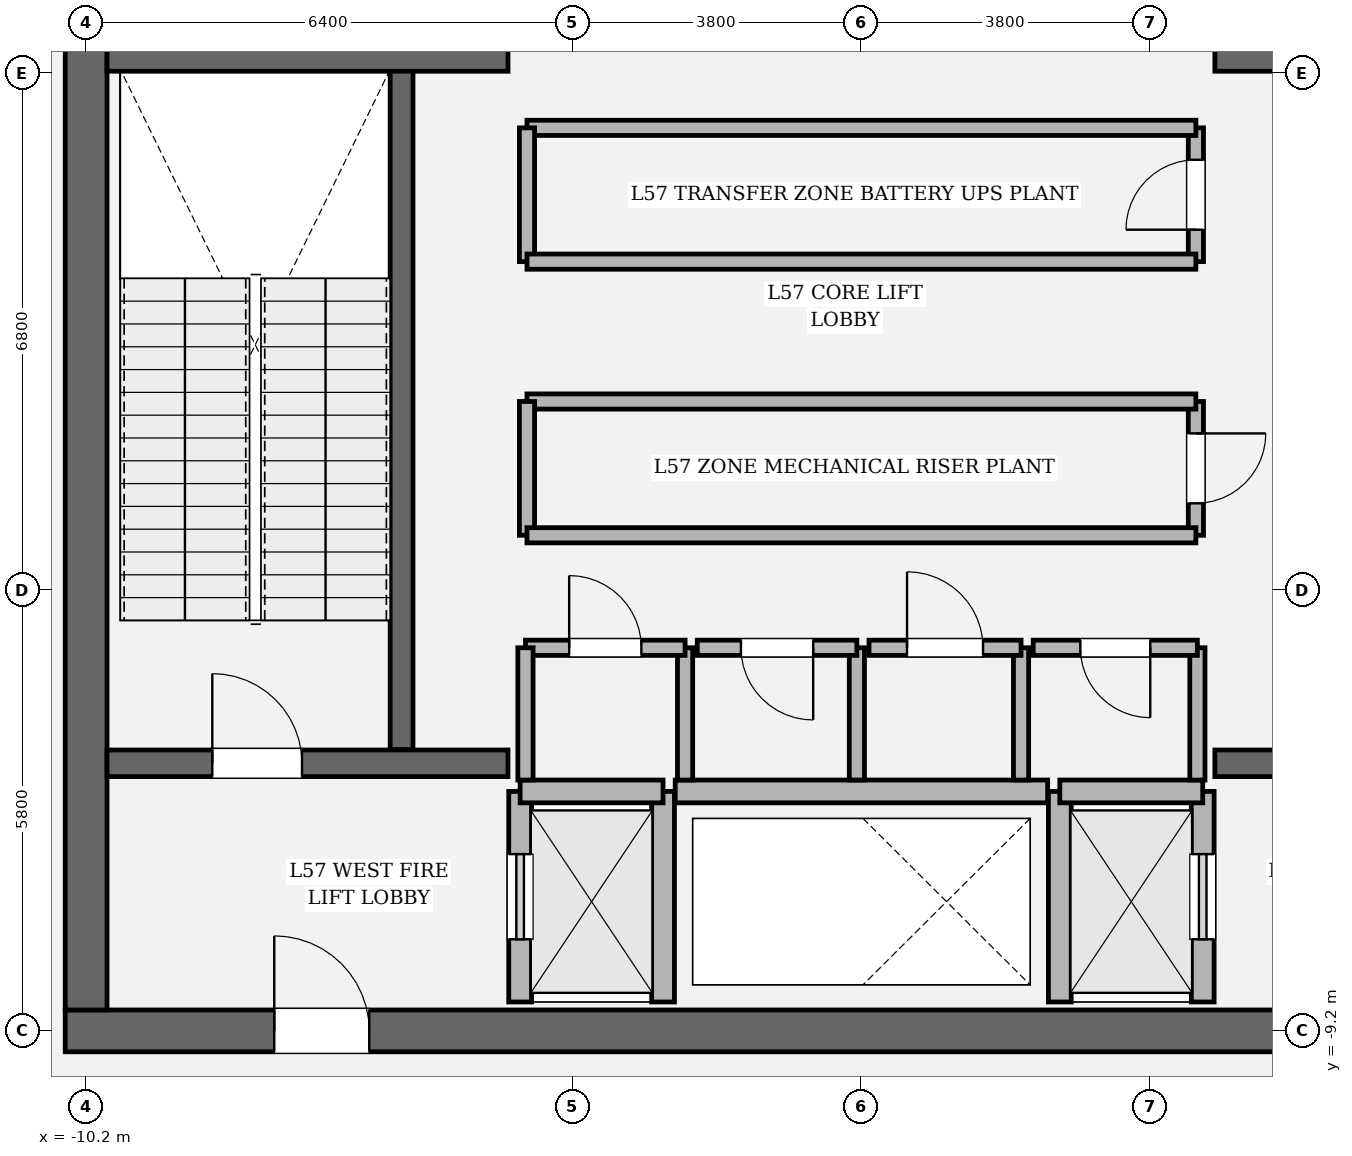
"""IFC4 building model, lengths in metres.
Left out: names, types, materials, properties, quantities, classifications, styles, units other than length and angle.
Written with IfcOpenShell. Run it as: python <this file> out.ifc"""

import sys

from ifc_helpers import new_model, si_unit, direction, frame, frame_2d, origin, place, context, subcontext, project, spatial, rectangle, extrude, element, fill, save


model = new_model("IFC4")
c1 = context("Model", 3, precision=1e-05, world=origin(), true_north=direction((0.0, 1.0)))
c2 = subcontext(c1, "Body", "Model", "MODEL_VIEW")
j1 = project(units=[si_unit("LENGTHUNIT", "METRE"), si_unit("PLANEANGLEUNIT", "RADIAN")], contexts=[c1])
p1 = place(None, origin())
s1 = spatial("IfcSite", under=j1, at=p1, CompositionType="ELEMENT")
p2 = place(p1, origin())
s2 = spatial("IfcBuilding", under=s1, at=p2, CompositionType="ELEMENT")
p3 = place(p2, frame((0.0, 0.0, 241.8)))
s3 = spatial("IfcBuildingStorey", under=s2, at=p3, CompositionType="ELEMENT", Elevation=241.8)
p4 = place(p3, frame((10.475, -9.2, 0.0), z_axis=(0.0, 0.0, 1.0), x_axis=(-1.0, 0.0, 0.0)))
e1 = element("IfcWall", 1, at=p4, inside=s3, PredefinedType="SHEAR", context=c2, shape_type="SweptSolid", body=[
    extrude(rectangle(XDim=20.95, YDim=0.55, at=frame_2d((10.475, 0.0))), origin(), (0.0, 0.0, 1.0), 4.8),
])
p5 = place(p4, frame((2.75, 0.0, 0.0)))
e2 = element("IfcOpeningElement", 2, at=p5, cuts=e1, PredefinedType="OPENING", context=c2, shape_type="SweptSolid", body=[
    extrude(rectangle(XDim=1.25, YDim=2.25, at=frame_2d((0.625, 1.125))), frame((0.0, 0.285, 0.0), z_axis=(0.0, -1.0, 0.0), x_axis=(1.0, 0.0, 0.0)), (0.0, 0.0, 1.0), 0.57),
])
p6 = place(p4, frame((16.95, 0.0, 0.0)))
e3 = element("IfcOpeningElement", 3, at=p6, cuts=e1, PredefinedType="OPENING", context=c2, shape_type="SweptSolid", body=[
    extrude(rectangle(XDim=1.25, YDim=2.25, at=frame_2d((0.625, 1.125))), frame((0.0, 0.285, 0.0), z_axis=(0.0, -1.0, 0.0), x_axis=(1.0, 0.0, 0.0)), (0.0, 0.0, 1.0), 0.57),
])
p7 = place(p3, frame((-10.2, -8.925, 0.0), z_axis=(0.0, 0.0, 1.0), x_axis=(0.0, 1.0, 0.0)))
e4 = element("IfcWall", 4, at=p7, inside=s3, PredefinedType="SHEAR", context=c2, shape_type="SweptSolid", body=[
    extrude(rectangle(XDim=17.85, YDim=0.55, at=frame_2d((8.925, 0.0))), origin(), (0.0, 0.0, 1.0), 4.8),
])
p8 = place(p7, frame((12.715, 0.0, 0.0)))
e5 = element("IfcOpeningElement", 5, at=p8, cuts=e4, PredefinedType="OPENING", context=c2, shape_type="SweptSolid", body=[
    extrude(rectangle(XDim=1.18, YDim=2.2, at=frame_2d((0.59, 1.1))), frame((0.0, 0.285, 0.0), z_axis=(0.0, -1.0, 0.0), x_axis=(1.0, 0.0, 0.0)), (0.0, 0.0, 1.0), 0.57),
])
p9 = place(p3, frame((-6.05, -5.5, 0.0), z_axis=(0.0, 0.0, 1.0), x_axis=(0.0, 1.0, 0.0)))
e6 = element("IfcWall", 6, at=p9, inside=s3, PredefinedType="SOLIDWALL", context=c2, shape_type="SweptSolid", body=[
    extrude(rectangle(XDim=8.95, YDim=0.3, at=frame_2d((4.475, 0.0))), origin(), (0.0, 0.0, 1.0), 4.8),
])
p10 = place(p3, frame((-9.925, -5.68, 0.0), z_axis=(0.0, 0.0, 1.0), x_axis=(1.0, 0.0, 0.0)))
e7 = element("IfcWall", 7, at=p10, inside=s3, PredefinedType="SOLIDWALL", context=c2, shape_type="SweptSolid", body=[
    extrude(rectangle(XDim=5.275, YDim=0.35, at=frame_2d((2.638, 0.0))), origin(), (0.0, 0.0, 1.0), 4.8),
])
p11 = place(p10, frame((1.385, 0.0, 0.0)))
e8 = element("IfcOpeningElement", 8, at=p11, cuts=e7, PredefinedType="OPENING", context=c2, shape_type="SweptSolid", body=[
    extrude(rectangle(XDim=1.18, YDim=2.2, at=frame_2d((0.59, 1.1))), frame((0.0, 0.185, 0.0), z_axis=(0.0, -1.0, 0.0), x_axis=(1.0, 0.0, 0.0)), (0.0, 0.0, 1.0), 0.37),
])
p12 = place(p3, frame((4.65, -5.68, 0.0), z_axis=(0.0, 0.0, 1.0), x_axis=(1.0, 0.0, 0.0)))
e9 = element("IfcWall", 9, at=p12, inside=s3, PredefinedType="SOLIDWALL", context=c2, shape_type="SweptSolid", body=[
    extrude(rectangle(XDim=5.275, YDim=0.35, at=frame_2d((2.638, 0.0))), origin(), (0.0, 0.0, 1.0), 4.8),
])
p13 = place(p12, frame((2.71, 0.0, 0.0)))
e10 = element("IfcOpeningElement", 10, at=p13, cuts=e9, PredefinedType="OPENING", context=c2, shape_type="SweptSolid", body=[
    extrude(rectangle(XDim=1.18, YDim=2.2, at=frame_2d((0.59, 1.1))), frame((0.0, 0.185, 0.0), z_axis=(0.0, -1.0, 0.0), x_axis=(1.0, 0.0, 0.0)), (0.0, 0.0, 1.0), 0.37),
])
for number, where, z_axis, x_axis in (
    (11, (-9.925, 3.6, 0.0), (0.0, 0.0, 1.0), (1.0, 0.0, 0.0)),
    (12, (4.65, 3.6, 0.0), (0.0, 0.0, 1.0), (1.0, 0.0, 0.0)),
):
    element("IfcWall", number, at=place(p3, frame(where, z_axis=z_axis, x_axis=x_axis)), inside=s3, PredefinedType="SOLIDWALL", context=c2, shape_type="SweptSolid", body=[
        extrude(rectangle(XDim=5.275, YDim=0.35, at=frame_2d((2.638, 0.0))), origin(), (0.0, 0.0, 1.0), 4.8),
    ])
p14 = place(p3, frame((-4.49, -8.82, 0.0), z_axis=(0.0, 0.0, 1.0), x_axis=(0.0, 1.0, 0.0)))
e13 = element("IfcWall", 13, at=p14, inside=s3, PredefinedType="SOLIDWALL", context=c2, shape_type="SweptSolid", body=[
    extrude(rectangle(XDim=2.77, YDim=0.3, at=frame_2d((1.385, 0.0))), origin(), (0.0, 0.0, 1.0), 4.54),
])
p15 = place(p14, frame((0.825, 0.0, 0.0)))
e14 = element("IfcOpeningElement", 14, at=p15, cuts=e13, PredefinedType="OPENING", context=c2, shape_type="SweptSolid", body=[
    extrude(rectangle(XDim=1.12, YDim=2.25, at=frame_2d((0.56, 1.125))), frame((0.0, 0.16, 0.0), z_axis=(0.0, -1.0, 0.0), x_axis=(1.0, 0.0, 0.0)), (0.0, 0.0, 1.0), 0.32),
])
p16 = place(p3, frame((-2.61, -8.82, 0.0), z_axis=(0.0, 0.0, 1.0), x_axis=(0.0, 1.0, 0.0)))
e15 = element("IfcWall", 15, at=p16, inside=s3, PredefinedType="SOLIDWALL", context=c2, shape_type="SweptSolid", body=[
    extrude(rectangle(XDim=2.77, YDim=0.3, at=frame_2d((1.385, 0.0))), origin(), (0.0, 0.0, 1.0), 4.54),
])
p17 = place(p3, frame((-4.49, -6.05, 0.0), z_axis=(0.0, 0.0, 1.0), x_axis=(1.0, 0.0, 0.0)))
e16 = element("IfcWall", 16, at=p17, inside=s3, PredefinedType="SOLIDWALL", context=c2, shape_type="SweptSolid", body=[
    extrude(rectangle(XDim=1.88, YDim=0.3, at=frame_2d((0.94, 0.0))), origin(), (0.0, 0.0, 1.0), 4.54),
])
p18 = place(p3, frame((4.49, -8.82, 0.0), z_axis=(0.0, 0.0, 1.0), x_axis=(0.0, 1.0, 0.0)))
e17 = element("IfcWall", 17, at=p18, inside=s3, PredefinedType="SOLIDWALL", context=c2, shape_type="SweptSolid", body=[
    extrude(rectangle(XDim=2.77, YDim=0.3, at=frame_2d((1.385, 0.0))), origin(), (0.0, 0.0, 1.0), 4.54),
])
p19 = place(p18, frame((0.825, 0.0, 0.0)))
e18 = element("IfcOpeningElement", 18, at=p19, cuts=e17, PredefinedType="OPENING", context=c2, shape_type="SweptSolid", body=[
    extrude(rectangle(XDim=1.12, YDim=2.25, at=frame_2d((0.56, 1.125))), frame((0.0, 0.16, 0.0), z_axis=(0.0, -1.0, 0.0), x_axis=(1.0, 0.0, 0.0)), (0.0, 0.0, 1.0), 0.32),
])
p20 = place(p3, frame((2.61, -8.82, 0.0), z_axis=(0.0, 0.0, 1.0), x_axis=(0.0, 1.0, 0.0)))
e19 = element("IfcWall", 19, at=p20, inside=s3, PredefinedType="SOLIDWALL", context=c2, shape_type="SweptSolid", body=[
    extrude(rectangle(XDim=2.77, YDim=0.3, at=frame_2d((1.385, 0.0))), origin(), (0.0, 0.0, 1.0), 4.54),
])
p21 = place(p3, frame((2.61, -6.05, 0.0), z_axis=(0.0, 0.0, 1.0), x_axis=(1.0, 0.0, 0.0)))
e20 = element("IfcWall", 20, at=p21, inside=s3, PredefinedType="SOLIDWALL", context=c2, shape_type="SweptSolid", body=[
    extrude(rectangle(XDim=1.88, YDim=0.3, at=frame_2d((0.94, 0.0))), origin(), (0.0, 0.0, 1.0), 4.54),
])
p22 = place(p3, frame((-2.45, -6.05, 0.0), z_axis=(0.0, 0.0, 1.0), x_axis=(1.0, 0.0, 0.0)))
e21 = element("IfcWall", 21, at=p22, inside=s3, PredefinedType="SOLIDWALL", context=c2, shape_type="SweptSolid", body=[
    extrude(rectangle(XDim=4.9, YDim=0.3, at=frame_2d((2.45, 0.0))), origin(), (0.0, 0.0, 1.0), 4.54),
])
p23 = place(p3, frame((-2.32, -5.9, 0.0), z_axis=(0.0, 0.0, 1.0), x_axis=(0.0, 1.0, 0.0)))
e22 = element("IfcWall", 22, at=p23, inside=s3, PredefinedType="SOLIDWALL", context=c2, shape_type="SweptSolid", body=[
    extrude(rectangle(XDim=1.74, YDim=0.2, at=frame_2d((0.87, 0.0))), origin(), (0.0, 0.0, 1.0), 4.54),
])
p24 = place(p3, frame((-2.32, -4.16, 0.0), z_axis=(0.0, 0.0, 1.0), x_axis=(-1.0, 0.0, 0.0)))
e23 = element("IfcWall", 23, at=p24, inside=s3, PredefinedType="SOLIDWALL", context=c2, shape_type="SweptSolid", body=[
    extrude(rectangle(XDim=2.1, YDim=0.2, at=frame_2d((1.05, 0.0))), origin(), (0.0, 0.0, 1.0), 4.54),
])
p25 = place(p24, frame((0.575, 0.0, 0.0)))
e24 = element("IfcOpeningElement", 24, at=p25, cuts=e23, PredefinedType="OPENING", context=c2, shape_type="SweptSolid", body=[
    extrude(rectangle(XDim=0.95, YDim=2.15, at=frame_2d((0.475, 1.075))), frame((0.0, 0.11, 0.0), z_axis=(0.0, -1.0, 0.0), x_axis=(1.0, 0.0, 0.0)), (0.0, 0.0, 1.0), 0.22),
])
for number, where, z_axis, x_axis in (
    (25, (-4.42, -4.16, 0.0), (0.0, 0.0, 1.0), (0.0, -1.0, 0.0)),
    (26, (-0.06, -5.9, 0.0), (0.0, 0.0, 1.0), (0.0, 1.0, 0.0)),
):
    element("IfcWall", number, at=place(p3, frame(where, z_axis=z_axis, x_axis=x_axis)), inside=s3, PredefinedType="SOLIDWALL", context=c2, shape_type="SweptSolid", body=[
        extrude(rectangle(XDim=1.74, YDim=0.2, at=frame_2d((0.87, 0.0))), origin(), (0.0, 0.0, 1.0), 4.54),
    ])
p26 = place(p3, frame((-0.06, -4.16, 0.0), z_axis=(0.0, 0.0, 1.0), x_axis=(-1.0, 0.0, 0.0)))
e27 = element("IfcWall", 27, at=p26, inside=s3, PredefinedType="SOLIDWALL", context=c2, shape_type="SweptSolid", body=[
    extrude(rectangle(XDim=2.1, YDim=0.2, at=frame_2d((1.05, 0.0))), origin(), (0.0, 0.0, 1.0), 4.54),
])
p27 = place(p26, frame((0.575, 0.0, 0.0)))
e28 = element("IfcOpeningElement", 28, at=p27, cuts=e27, PredefinedType="OPENING", context=c2, shape_type="SweptSolid", body=[
    extrude(rectangle(XDim=0.95, YDim=2.15, at=frame_2d((0.475, 1.075))), frame((0.0, 0.11, 0.0), z_axis=(0.0, -1.0, 0.0), x_axis=(1.0, 0.0, 0.0)), (0.0, 0.0, 1.0), 0.22),
])
p28 = place(p3, frame((2.1, -5.9, 0.0), z_axis=(0.0, 0.0, 1.0), x_axis=(0.0, 1.0, 0.0)))
e29 = element("IfcWall", 29, at=p28, inside=s3, PredefinedType="SOLIDWALL", context=c2, shape_type="SweptSolid", body=[
    extrude(rectangle(XDim=1.74, YDim=0.2, at=frame_2d((0.87, 0.0))), origin(), (0.0, 0.0, 1.0), 4.54),
])
p29 = place(p3, frame((2.1, -4.16, 0.0), z_axis=(0.0, 0.0, 1.0), x_axis=(-1.0, 0.0, 0.0)))
e30 = element("IfcWall", 30, at=p29, inside=s3, PredefinedType="SOLIDWALL", context=c2, shape_type="SweptSolid", body=[
    extrude(rectangle(XDim=2.0, YDim=0.2, at=frame_2d((1.0, 0.0))), origin(), (0.0, 0.0, 1.0), 4.54),
])
p30 = place(p29, frame((0.5, 0.0, 0.0)))
e31 = element("IfcOpeningElement", 31, at=p30, cuts=e30, PredefinedType="OPENING", context=c2, shape_type="SweptSolid", body=[
    extrude(rectangle(XDim=1.0, YDim=2.15, at=frame_2d((0.5, 1.075))), frame((0.0, 0.11, 0.0), z_axis=(0.0, -1.0, 0.0), x_axis=(1.0, 0.0, 0.0)), (0.0, 0.0, 1.0), 0.22),
])
p31 = place(p3, frame((4.42, -5.9, 0.0), z_axis=(0.0, 0.0, 1.0), x_axis=(0.0, 1.0, 0.0)))
e32 = element("IfcWall", 32, at=p31, inside=s3, PredefinedType="SOLIDWALL", context=c2, shape_type="SweptSolid", body=[
    extrude(rectangle(XDim=1.74, YDim=0.2, at=frame_2d((0.87, 0.0))), origin(), (0.0, 0.0, 1.0), 4.54),
])
p32 = place(p3, frame((4.42, -4.16, 0.0), z_axis=(0.0, 0.0, 1.0), x_axis=(-1.0, 0.0, 0.0)))
e33 = element("IfcWall", 33, at=p32, inside=s3, PredefinedType="SOLIDWALL", context=c2, shape_type="SweptSolid", body=[
    extrude(rectangle(XDim=2.16, YDim=0.2, at=frame_2d((1.08, 0.0))), origin(), (0.0, 0.0, 1.0), 4.54),
])
p33 = place(p32, frame((0.62, 0.0, 0.0)))
e34 = element("IfcOpeningElement", 34, at=p33, cuts=e33, PredefinedType="OPENING", context=c2, shape_type="SweptSolid", body=[
    extrude(rectangle(XDim=0.92, YDim=2.1, at=frame_2d((0.46, 1.05))), frame((0.0, 0.11, 0.0), z_axis=(0.0, -1.0, 0.0), x_axis=(1.0, 0.0, 0.0)), (0.0, 0.0, 1.0), 0.22),
])
p34 = place(p3, frame((4.4, -2.68, 0.0), z_axis=(0.0, 0.0, 1.0), x_axis=(0.0, 1.0, 0.0)))
e35 = element("IfcWall", 35, at=p34, inside=s3, PredefinedType="SOLIDWALL", context=c2, shape_type="SweptSolid", body=[
    extrude(rectangle(XDim=1.76, YDim=0.2, at=frame_2d((0.88, 0.0))), origin(), (0.0, 0.0, 1.0), 4.54),
])
p35 = place(p34, frame((0.42, 0.0, 0.0)))
e36 = element("IfcOpeningElement", 36, at=p35, cuts=e35, PredefinedType="OPENING", context=c2, shape_type="SweptSolid", body=[
    extrude(rectangle(XDim=0.92, YDim=2.1, at=frame_2d((0.46, 1.05))), frame((0.0, 0.11, 0.0), z_axis=(0.0, -1.0, 0.0), x_axis=(1.0, 0.0, 0.0)), (0.0, 0.0, 1.0), 0.22),
])
p36 = place(p3, frame((4.4, -0.92, 0.0), z_axis=(0.0, 0.0, 1.0), x_axis=(-1.0, 0.0, 0.0)))
e37 = element("IfcWall", 37, at=p36, inside=s3, PredefinedType="SOLIDWALL", context=c2, shape_type="SweptSolid", body=[
    extrude(rectangle(XDim=8.8, YDim=0.2, at=frame_2d((4.4, 0.0))), origin(), (0.0, 0.0, 1.0), 4.54),
])
p37 = place(p3, frame((-4.4, -0.92, 0.0), z_axis=(0.0, 0.0, 1.0), x_axis=(0.0, -1.0, 0.0)))
e38 = element("IfcWall", 38, at=p37, inside=s3, PredefinedType="SOLIDWALL", context=c2, shape_type="SweptSolid", body=[
    extrude(rectangle(XDim=1.76, YDim=0.2, at=frame_2d((0.88, 0.0))), origin(), (0.0, 0.0, 1.0), 4.54),
])
p38 = place(p3, frame((-4.4, -2.68, 0.0), z_axis=(0.0, 0.0, 1.0), x_axis=(1.0, 0.0, 0.0)))
e39 = element("IfcWall", 39, at=p38, inside=s3, PredefinedType="SOLIDWALL", context=c2, shape_type="SweptSolid", body=[
    extrude(rectangle(XDim=8.8, YDim=0.2, at=frame_2d((4.4, 0.0))), origin(), (0.0, 0.0, 1.0), 4.54),
])
p39 = place(p3, frame((4.4, 0.92, 0.0), z_axis=(0.0, 0.0, 1.0), x_axis=(0.0, 1.0, 0.0)))
e40 = element("IfcWall", 40, at=p39, inside=s3, PredefinedType="SOLIDWALL", context=c2, shape_type="SweptSolid", body=[
    extrude(rectangle(XDim=1.76, YDim=0.2, at=frame_2d((0.88, 0.0))), origin(), (0.0, 0.0, 1.0), 4.54),
])
p40 = place(p39, frame((0.42, 0.0, 0.0)))
e41 = element("IfcOpeningElement", 41, at=p40, cuts=e40, PredefinedType="OPENING", context=c2, shape_type="SweptSolid", body=[
    extrude(rectangle(XDim=0.92, YDim=2.1, at=frame_2d((0.46, 1.05))), frame((0.0, 0.11, 0.0), z_axis=(0.0, -1.0, 0.0), x_axis=(1.0, 0.0, 0.0)), (0.0, 0.0, 1.0), 0.22),
])
p41 = place(p3, frame((4.4, 2.68, 0.0), z_axis=(0.0, 0.0, 1.0), x_axis=(-1.0, 0.0, 0.0)))
e42 = element("IfcWall", 42, at=p41, inside=s3, PredefinedType="SOLIDWALL", context=c2, shape_type="SweptSolid", body=[
    extrude(rectangle(XDim=8.8, YDim=0.2, at=frame_2d((4.4, 0.0))), origin(), (0.0, 0.0, 1.0), 4.54),
])
p42 = place(p3, frame((-4.4, 2.68, 0.0), z_axis=(0.0, 0.0, 1.0), x_axis=(0.0, -1.0, 0.0)))
e43 = element("IfcWall", 43, at=p42, inside=s3, PredefinedType="SOLIDWALL", context=c2, shape_type="SweptSolid", body=[
    extrude(rectangle(XDim=1.76, YDim=0.2, at=frame_2d((0.88, 0.0))), origin(), (0.0, 0.0, 1.0), 4.54),
])
p43 = place(p3, frame((-4.4, 0.92, 0.0), z_axis=(0.0, 0.0, 1.0), x_axis=(1.0, 0.0, 0.0)))
e44 = element("IfcWall", 44, at=p43, inside=s3, PredefinedType="SOLIDWALL", context=c2, shape_type="SweptSolid", body=[
    extrude(rectangle(XDim=8.8, YDim=0.2, at=frame_2d((4.4, 0.0))), origin(), (0.0, 0.0, 1.0), 4.54),
])
p44 = place(p11, origin())
e45 = element("IfcDoor", 45, at=p44, inside=s3, OperationType="SINGLE_SWING_LEFT", PredefinedType="DOOR", context=c2, shape_type="SweptSolid", body=[
    extrude(rectangle(XDim=1.18, YDim=2.2, at=frame_2d((0.59, 1.1))), frame((0.0, 0.025, 0.0), z_axis=(0.0, -1.0, 0.0), x_axis=(1.0, 0.0, 0.0)), (0.0, 0.0, 1.0), 0.05),
])
fill(e8, e45)
p45 = place(p6, origin())
e46 = element("IfcDoor", 46, at=p45, inside=s3, OperationType="SINGLE_SWING_RIGHT", PredefinedType="DOOR", context=c2, shape_type="SweptSolid", body=[
    extrude(rectangle(XDim=1.25, YDim=2.25, at=frame_2d((0.625, 1.125))), frame((0.0, 0.025, 0.0), z_axis=(0.0, -1.0, 0.0), x_axis=(1.0, 0.0, 0.0)), (0.0, 0.0, 1.0), 0.05),
])
fill(e3, e46)
p46 = place(p15, origin())
e47 = element("IfcDoor", 47, at=p46, inside=s3, OperationType="SLIDING_TO_LEFT", PredefinedType="DOOR", context=c2, shape_type="SweptSolid", body=[
    extrude(rectangle(XDim=1.12, YDim=2.25, at=frame_2d((0.56, 1.125))), frame((0.0, 0.025, 0.0), z_axis=(0.0, -1.0, 0.0), x_axis=(1.0, 0.0, 0.0)), (0.0, 0.0, 1.0), 0.05),
])
fill(e14, e47)
p47 = place(p19, origin())
e48 = element("IfcDoor", 48, at=p47, inside=s3, OperationType="SLIDING_TO_RIGHT", PredefinedType="DOOR", context=c2, shape_type="SweptSolid", body=[
    extrude(rectangle(XDim=1.12, YDim=2.25, at=frame_2d((0.56, 1.125))), frame((0.0, 0.025, 0.0), z_axis=(0.0, -1.0, 0.0), x_axis=(1.0, 0.0, 0.0)), (0.0, 0.0, 1.0), 0.05),
])
fill(e18, e48)
p48 = place(p25, origin())
e49 = element("IfcDoor", 49, at=p48, inside=s3, OperationType="SINGLE_SWING_RIGHT", PredefinedType="DOOR", context=c2, shape_type="SweptSolid", body=[
    extrude(rectangle(XDim=0.95, YDim=2.15, at=frame_2d((0.475, 1.075))), frame((0.0, 0.025, 0.0), z_axis=(0.0, -1.0, 0.0), x_axis=(1.0, 0.0, 0.0)), (0.0, 0.0, 1.0), 0.05),
])
fill(e24, e49)
p49 = place(p27, origin())
e50 = element("IfcDoor", 50, at=p49, inside=s3, OperationType="SINGLE_SWING_LEFT", PredefinedType="DOOR", context=c2, shape_type="SweptSolid", body=[
    extrude(rectangle(XDim=0.95, YDim=2.15, at=frame_2d((0.475, 1.075))), frame((0.0, 0.025, 0.0), z_axis=(0.0, -1.0, 0.0), x_axis=(1.0, 0.0, 0.0)), (0.0, 0.0, 1.0), 0.05),
])
fill(e28, e50)
p50 = place(p30, origin())
e51 = element("IfcDoor", 51, at=p50, inside=s3, OperationType="SINGLE_SWING_RIGHT", PredefinedType="DOOR", context=c2, shape_type="SweptSolid", body=[
    extrude(rectangle(XDim=1.0, YDim=2.15, at=frame_2d((0.5, 1.075))), frame((0.0, 0.025, 0.0), z_axis=(0.0, -1.0, 0.0), x_axis=(1.0, 0.0, 0.0)), (0.0, 0.0, 1.0), 0.05),
])
fill(e31, e51)
p51 = place(p33, origin())
e52 = element("IfcDoor", 52, at=p51, inside=s3, OperationType="SINGLE_SWING_LEFT", PredefinedType="DOOR", context=c2, shape_type="SweptSolid", body=[
    extrude(rectangle(XDim=0.92, YDim=2.1, at=frame_2d((0.46, 1.05))), frame((0.0, 0.025, 0.0), z_axis=(0.0, -1.0, 0.0), x_axis=(1.0, 0.0, 0.0)), (0.0, 0.0, 1.0), 0.05),
])
fill(e34, e52)
p52 = place(p35, origin())
e53 = element("IfcDoor", 53, at=p52, inside=s3, OperationType="SINGLE_SWING_RIGHT", PredefinedType="DOOR", context=c2, shape_type="SweptSolid", body=[
    extrude(rectangle(XDim=0.92, YDim=2.1, at=frame_2d((0.46, 1.05))), frame((0.0, 0.025, 0.0), z_axis=(0.0, -1.0, 0.0), x_axis=(1.0, 0.0, 0.0)), (0.0, 0.0, 1.0), 0.05),
])
fill(e36, e53)
p53 = place(p40, origin())
e54 = element("IfcDoor", 54, at=p53, inside=s3, OperationType="SINGLE_SWING_LEFT", PredefinedType="DOOR", context=c2, shape_type="SweptSolid", body=[
    extrude(rectangle(XDim=0.92, YDim=2.1, at=frame_2d((0.46, 1.05))), frame((0.0, 0.025, 0.0), z_axis=(0.0, -1.0, 0.0), x_axis=(1.0, 0.0, 0.0)), (0.0, 0.0, 1.0), 0.05),
])
fill(e41, e54)
save(model, sys.argv[1])
